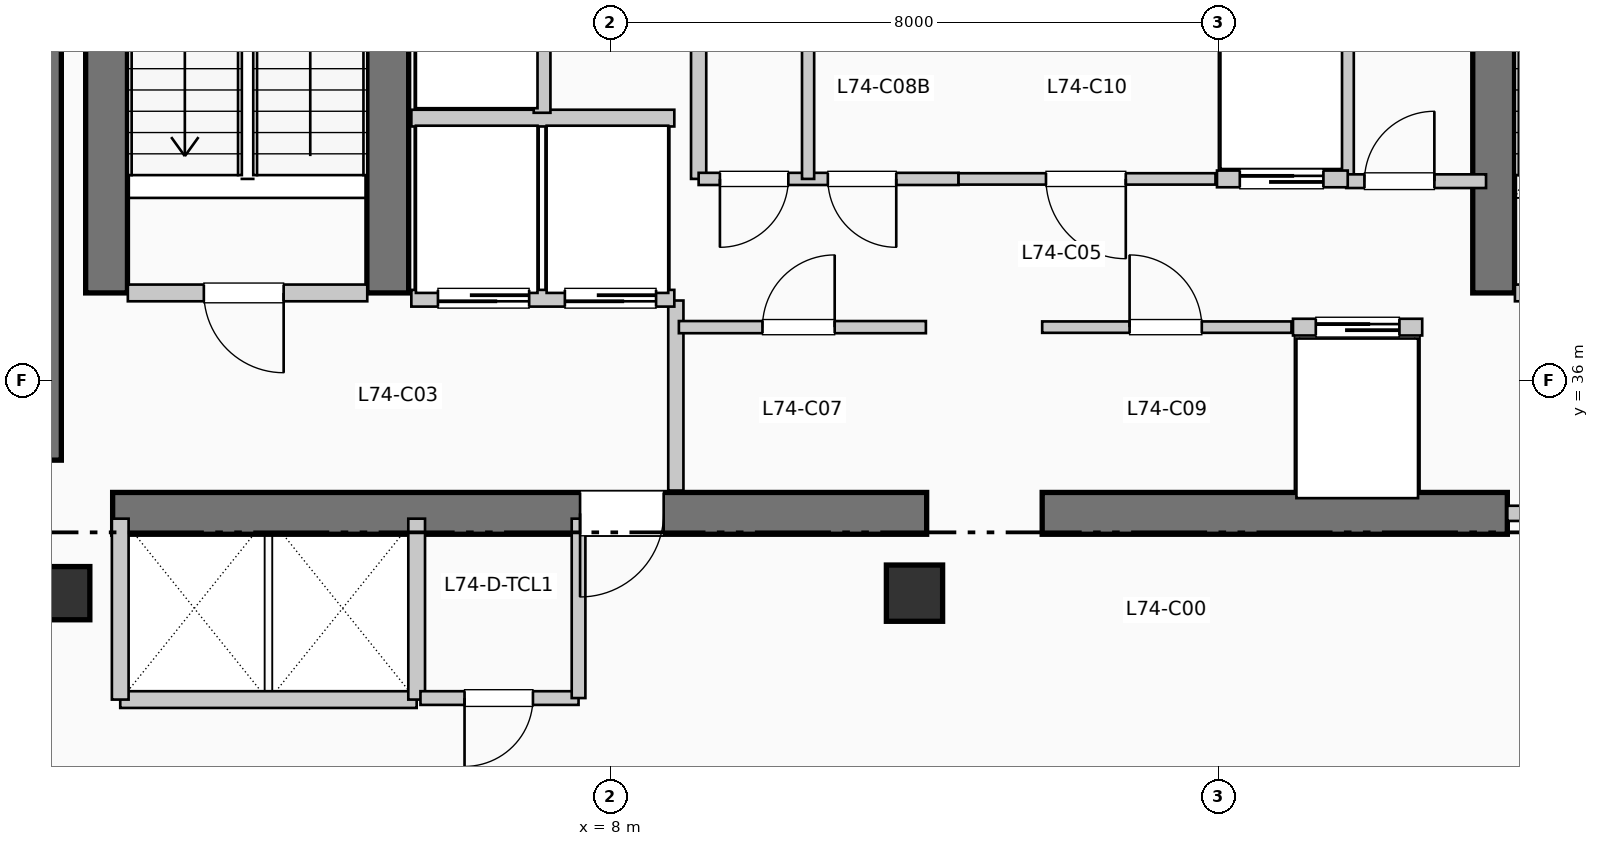
"""IFC4 building model, lengths in metres.
Left out: names, types, materials, properties, quantities, classifications, styles, units other than length and angle.
Written with IfcOpenShell. Run it as: python <this file> out.ifc"""

import sys

from ifc_helpers import new_model, si_unit, direction, frame, frame_2d, origin, origin_2d, place, context, subcontext, project, spatial, rectangle, extrude, element, fill, save


model = new_model("IFC4")
c1 = context("Model", 3, precision=1e-05, world=origin(), true_north=direction((0.0, 1.0)))
c2 = subcontext(c1, "Body", "Model", "MODEL_VIEW")
j1 = project(units=[si_unit("LENGTHUNIT", "METRE"), si_unit("PLANEANGLEUNIT", "RADIAN")], contexts=[c1])
p1 = place(None, origin())
s1 = spatial("IfcSite", under=j1, at=p1, CompositionType="ELEMENT")
p2 = place(p1, origin())
s2 = spatial("IfcBuilding", under=s1, at=p2, CompositionType="ELEMENT")
p3 = place(p2, frame((0.0, 0.0, 303.93)))
s3 = spatial("IfcBuildingStorey", under=s2, at=p3, CompositionType="ELEMENT", Elevation=303.93)
p4 = place(p3, frame((0.5, 34.95, 0.0), z_axis=(0.0, 0.0, 1.0), x_axis=(0.0, 1.0, 0.0)))
e1 = element("IfcWall", 1, at=p4, inside=s3, PredefinedType="SHEAR", context=c2, shape_type="SweptSolid", body=[
    extrude(rectangle(XDim=7.9, YDim=0.55, at=frame_2d((3.95, 0.0))), origin(), (0.0, 0.0, 1.0), 3.96),
])
p5 = place(p3, frame((1.45, 34.25, 0.0), z_axis=(0.0, 0.0, 1.0), x_axis=(1.0, 0.0, 0.0)))
e2 = element("IfcWall", 2, at=p5, inside=s3, PredefinedType="SHEAR", context=c2, shape_type="SweptSolid", body=[
    extrude(rectangle(XDim=10.71, YDim=0.55, at=frame_2d((5.355, 0.0))), origin(), (0.0, 0.0, 1.0), 3.96),
])
p6 = place(p5, frame((7.25, 0.0, 0.0), z_axis=(0.0, 0.0, 1.0), x_axis=(-1.0, 0.0, 0.0)))
e3 = element("IfcOpeningElement", 3, at=p6, cuts=e2, PredefinedType="OPENING", context=c2, shape_type="SweptSolid", body=[
    extrude(rectangle(XDim=1.1, YDim=2.15, at=frame_2d((0.55, 1.075))), frame((0.0, 0.285, 0.0), z_axis=(0.0, -1.0, 0.0), x_axis=(1.0, 0.0, 0.0)), (0.0, 0.0, 1.0), 0.57),
])
p7 = place(p3, frame((13.68, 34.25, 0.0), z_axis=(0.0, 0.0, 1.0), x_axis=(1.0, 0.0, 0.0)))
e4 = element("IfcWall", 4, at=p7, inside=s3, PredefinedType="SHEAR", context=c2, shape_type="SweptSolid", body=[
    extrude(rectangle(XDim=6.12, YDim=0.55, at=frame_2d((3.06, 0.0))), origin(), (0.0, 0.0, 1.0), 3.96),
])
for number, where, z_axis, x_axis in (
    (5, (1.37, 37.15, 0.0), (0.0, 0.0, 1.0), (0.0, 1.0, 0.0)),
    (6, (5.07, 37.15, 0.0), (0.0, 0.0, 1.0), (0.0, 1.0, 0.0)),
    (7, (19.62, 37.15, 0.0), (0.0, 0.0, 1.0), (0.0, 1.0, 0.0)),
):
    element("IfcWall", number, at=place(p3, frame(where, z_axis=z_axis, x_axis=x_axis)), inside=s3, PredefinedType="SHEAR", context=c2, shape_type="SweptSolid", body=[
        extrude(rectangle(XDim=7.89, YDim=0.55, at=frame_2d((3.945, 0.0))), origin(), (0.0, 0.0, 1.0), 3.96),
    ])
p8 = place(p3, frame((0.8, 33.2, 0.0), z_axis=(0.0, 0.0, 1.0), x_axis=(1.0, 0.0, 0.0)))
e8 = element("IfcColumn", 8, at=p8, inside=s3, PredefinedType="COLUMN", context=c2, shape_type="SweptSolid", body=[
    extrude(rectangle(XDim=0.7, YDim=0.7, at=origin_2d()), origin(), (0.0, 0.0, 1.0), 3.96),
])
p9 = place(p3, frame((12.0, 33.2, 0.0), z_axis=(0.0, 0.0, 1.0), x_axis=(1.0, 0.0, 0.0)))
e9 = element("IfcColumn", 9, at=p9, inside=s3, PredefinedType="COLUMN", context=c2, shape_type="SweptSolid", body=[
    extrude(rectangle(XDim=0.74, YDim=0.74, at=origin_2d()), origin(), (0.0, 0.0, 1.0), 3.96),
])
p10 = place(p3, frame((1.65, 37.15, 0.0), z_axis=(0.0, 0.0, 1.0), x_axis=(1.0, 0.0, 0.0)))
e10 = element("IfcWall", 10, at=p10, inside=s3, PredefinedType="PARTITIONING", context=c2, shape_type="SweptSolid", body=[
    extrude(rectangle(XDim=3.15, YDim=0.22, at=frame_2d((1.575, 0.0))), origin(), (0.0, 0.0, 1.0), 3.74),
])
p11 = place(p10, frame((2.05, 0.0, 0.0), z_axis=(0.0, 0.0, 1.0), x_axis=(-1.0, 0.0, 0.0)))
e11 = element("IfcOpeningElement", 11, at=p11, cuts=e10, PredefinedType="OPENING", context=c2, shape_type="SweptSolid", body=[
    extrude(rectangle(XDim=1.05, YDim=2.15, at=frame_2d((0.525, 1.075))), frame((0.0, 0.12, 0.0), z_axis=(0.0, -1.0, 0.0), x_axis=(1.0, 0.0, 0.0)), (0.0, 0.0, 1.0), 0.24),
])
p12 = place(p3, frame((8.86, 34.55, 0.0), z_axis=(0.0, 0.0, 1.0), x_axis=(0.0, 1.0, 0.0)))
e12 = element("IfcWall", 12, at=p12, inside=s3, PredefinedType="PARTITIONING", context=c2, shape_type="SweptSolid", body=[
    extrude(rectangle(XDim=2.5, YDim=0.2, at=frame_2d((1.25, 0.0))), origin(), (0.0, 0.0, 1.0), 3.74),
])
p13 = place(p3, frame((19.9, 37.15, 0.0), z_axis=(0.0, 0.0, 1.0), x_axis=(1.0, 0.0, 0.0)))
e13 = element("IfcWall", 13, at=p13, inside=s3, PredefinedType="PARTITIONING", context=c2, shape_type="SweptSolid", body=[
    extrude(rectangle(XDim=3.15, YDim=0.22, at=frame_2d((1.575, 0.0))), origin(), (0.0, 0.0, 1.0), 3.74),
])
p14 = place(p13, frame((2.05, 0.0, 0.0), z_axis=(0.0, 0.0, 1.0), x_axis=(-1.0, 0.0, 0.0)))
e14 = element("IfcOpeningElement", 14, at=p14, cuts=e13, PredefinedType="OPENING", context=c2, shape_type="SweptSolid", body=[
    extrude(rectangle(XDim=1.05, YDim=2.15, at=frame_2d((0.525, 1.075))), frame((0.0, 0.12, 0.0), z_axis=(0.0, -1.0, 0.0), x_axis=(1.0, 0.0, 0.0)), (0.0, 0.0, 1.0), 0.24),
])
p15 = place(p3, frame((19.8, 34.25, 0.0), z_axis=(0.0, 0.0, 1.0), x_axis=(1.0, 0.0, 0.0)))
e15 = element("IfcWall", 15, at=p15, inside=s3, PredefinedType="PARTITIONING", context=c2, shape_type="SweptSolid", body=[
    extrude(rectangle(XDim=3.25, YDim=0.2, at=frame_2d((1.625, 0.0))), origin(), (0.0, 0.0, 1.0), 3.74),
])
p16 = place(p15, frame((2.15, 0.0, 0.0), z_axis=(0.0, 0.0, 1.0), x_axis=(-1.0, 0.0, 0.0)))
e16 = element("IfcOpeningElement", 16, at=p16, cuts=e15, PredefinedType="OPENING", context=c2, shape_type="SweptSolid", body=[
    extrude(rectangle(XDim=1.1, YDim=2.15, at=frame_2d((0.55, 1.075))), frame((0.0, 0.11, 0.0), z_axis=(0.0, -1.0, 0.0), x_axis=(1.0, 0.0, 0.0)), (0.0, 0.0, 1.0), 0.22),
])
p17 = place(p3, frame((5.38, 37.08, 0.0), z_axis=(0.0, 0.0, 1.0), x_axis=(1.0, 0.0, 0.0)))
e17 = element("IfcWall", 17, at=p17, inside=s3, PredefinedType="PARTITIONING", context=c2, shape_type="SweptSolid", body=[
    extrude(rectangle(XDim=3.46, YDim=0.22, at=frame_2d((1.73, 0.0))), origin(), (0.0, 0.0, 1.0), 3.74),
])
p18 = place(p17, frame((1.55, 0.0, 0.0), z_axis=(0.0, 0.0, 1.0), x_axis=(-1.0, 0.0, 0.0)))
e18 = element("IfcOpeningElement", 18, at=p18, cuts=e17, PredefinedType="OPENING", context=c2, shape_type="SweptSolid", body=[
    extrude(rectangle(XDim=1.2, YDim=2.2, at=frame_2d((0.6, 1.1))), frame((0.0, 0.12, 0.0), z_axis=(0.0, -1.0, 0.0), x_axis=(1.0, 0.0, 0.0)), (0.0, 0.0, 1.0), 0.24),
])
p19 = place(p17, frame((3.22, 0.0, 0.0), z_axis=(0.0, 0.0, 1.0), x_axis=(-1.0, 0.0, 0.0)))
e19 = element("IfcOpeningElement", 19, at=p19, cuts=e17, PredefinedType="OPENING", context=c2, shape_type="SweptSolid", body=[
    extrude(rectangle(XDim=1.2, YDim=2.2, at=frame_2d((0.6, 1.1))), frame((0.0, 0.12, 0.0), z_axis=(0.0, -1.0, 0.0), x_axis=(1.0, 0.0, 0.0)), (0.0, 0.0, 1.0), 0.24),
])
p20 = place(p3, frame((5.38, 39.45, 0.0), z_axis=(0.0, 0.0, 1.0), x_axis=(1.0, 0.0, 0.0)))
e20 = element("IfcWall", 20, at=p20, inside=s3, PredefinedType="PARTITIONING", context=c2, shape_type="SweptSolid", body=[
    extrude(rectangle(XDim=3.46, YDim=0.22, at=frame_2d((1.73, 0.0))), origin(), (0.0, 0.0, 1.0), 3.74),
])
p21 = place(p3, frame((7.1, 39.52, 0.0), z_axis=(0.0, 0.0, 1.0), x_axis=(0.0, 1.0, 0.0)))
e21 = element("IfcWall", 21, at=p21, inside=s3, PredefinedType="PARTITIONING", context=c2, shape_type="SweptSolid", body=[
    extrude(rectangle(XDim=2.93, YDim=0.22, at=frame_2d((1.465, 0.0))), origin(), (0.0, 0.0, 1.0), 3.74),
])
p22 = place(p21, frame((0.85, 0.0, 0.0)))
e22 = element("IfcOpeningElement", 22, at=p22, cuts=e21, PredefinedType="OPENING", context=c2, shape_type="SweptSolid", body=[
    extrude(rectangle(XDim=1.1, YDim=2.2, at=frame_2d((0.55, 1.1))), frame((0.0, 0.12, 0.0), z_axis=(0.0, -1.0, 0.0), x_axis=(1.0, 0.0, 0.0)), (0.0, 0.0, 1.0), 0.24),
])
p23 = place(p3, frame((1.55, 31.8, 0.0), z_axis=(0.0, 0.0, 1.0), x_axis=(1.0, 0.0, 0.0)))
e23 = element("IfcWall", 23, at=p23, inside=s3, PredefinedType="PARTITIONING", context=c2, shape_type="SweptSolid", body=[
    extrude(rectangle(XDim=3.9, YDim=0.22, at=frame_2d((1.95, 0.0))), origin(), (0.0, 0.0, 1.0), 3.74),
])
for number, where, z_axis, x_axis in (
    (24, (1.55, 31.8, 0.0), (0.0, 0.0, 1.0), (0.0, 1.0, 0.0)),
    (25, (5.45, 31.8, 0.0), (0.0, 0.0, 1.0), (0.0, 1.0, 0.0)),
):
    element("IfcWall", number, at=place(p3, frame(where, z_axis=z_axis, x_axis=x_axis)), inside=s3, PredefinedType="PARTITIONING", context=c2, shape_type="SweptSolid", body=[
        extrude(rectangle(XDim=2.38, YDim=0.22, at=frame_2d((1.19, 0.0))), origin(), (0.0, 0.0, 1.0), 3.74),
    ])
for number, where, z_axis, x_axis in (
    (26, (9.16, 38.65, 0.0), (0.0, 0.0, 1.0), (0.0, 1.0, 0.0)),
    (27, (17.68, 38.65, 0.0), (0.0, 0.0, 1.0), (0.0, 1.0, 0.0)),
):
    element("IfcWall", number, at=place(p3, frame(where, z_axis=z_axis, x_axis=x_axis)), inside=s3, PredefinedType="PARTITIONING", context=c2, shape_type="SweptSolid", body=[
        extrude(rectangle(XDim=2.35, YDim=0.2, at=frame_2d((1.175, 0.0))), origin(), (0.0, 0.0, 1.0), 3.74),
    ])
p24 = place(p3, frame((17.68, 38.62, 0.0), z_axis=(0.0, 0.0, 1.0), x_axis=(1.0, 0.0, 0.0)))
e28 = element("IfcWall", 28, at=p24, inside=s3, PredefinedType="PARTITIONING", context=c2, shape_type="SweptSolid", body=[
    extrude(rectangle(XDim=1.84, YDim=0.18, at=frame_2d((0.92, 0.0))), origin(), (0.0, 0.0, 1.0), 3.74),
])
p25 = place(p24, frame((0.24, 0.0, 0.0)))
e29 = element("IfcOpeningElement", 29, at=p25, cuts=e28, PredefinedType="OPENING", context=c2, shape_type="SweptSolid", body=[
    extrude(rectangle(XDim=0.92, YDim=2.1, at=frame_2d((0.46, 1.05))), frame((0.0, 0.1, 0.0), z_axis=(0.0, -1.0, 0.0), x_axis=(1.0, 0.0, 0.0)), (0.0, 0.0, 1.0), 0.2),
])
p26 = place(p3, frame((5.5, 31.82, 0.0), z_axis=(0.0, 0.0, 1.0), x_axis=(1.0, 0.0, 0.0)))
e30 = element("IfcWall", 30, at=p26, inside=s3, PredefinedType="PLUMBINGWALL", context=c2, shape_type="SweptSolid", body=[
    extrude(rectangle(XDim=2.08, YDim=0.18, at=frame_2d((1.04, 0.0))), origin(), (0.0, 0.0, 1.0), 3.74),
])
p27 = place(p26, frame((1.48, 0.0, 0.0), z_axis=(0.0, 0.0, 1.0), x_axis=(-1.0, 0.0, 0.0)))
e31 = element("IfcOpeningElement", 31, at=p27, cuts=e30, PredefinedType="OPENING", context=c2, shape_type="SweptSolid", body=[
    extrude(rectangle(XDim=0.9, YDim=2.1, at=frame_2d((0.45, 1.05))), frame((0.0, 0.1, 0.0), z_axis=(0.0, -1.0, 0.0), x_axis=(1.0, 0.0, 0.0)), (0.0, 0.0, 1.0), 0.2),
])
p28 = place(p3, frame((7.58, 31.82, 0.0), z_axis=(0.0, 0.0, 1.0), x_axis=(0.0, 1.0, 0.0)))
e32 = element("IfcWall", 32, at=p28, inside=s3, PredefinedType="PLUMBINGWALL", context=c2, shape_type="SweptSolid", body=[
    extrude(rectangle(XDim=2.36, YDim=0.18, at=frame_2d((1.18, 0.0))), origin(), (0.0, 0.0, 1.0), 3.74),
])
p29 = place(p3, frame((8.9, 36.7, 0.0), z_axis=(0.0, 0.0, 1.0), x_axis=(1.0, 0.0, 0.0)))
e33 = element("IfcWall", 33, at=p29, inside=s3, PredefinedType="PARTITIONING", context=c2, shape_type="SweptSolid", body=[
    extrude(rectangle(XDim=3.25, YDim=0.16, at=frame_2d((1.625, 0.0))), origin(), (0.0, 0.0, 1.0), 3.74),
])
p30 = place(p29, frame((1.1, 0.0, 0.0)))
e34 = element("IfcOpeningElement", 34, at=p30, cuts=e33, PredefinedType="OPENING", context=c2, shape_type="SweptSolid", body=[
    extrude(rectangle(XDim=0.95, YDim=2.15, at=frame_2d((0.475, 1.075))), frame((0.0, 0.09, 0.0), z_axis=(0.0, -1.0, 0.0), x_axis=(1.0, 0.0, 0.0)), (0.0, 0.0, 1.0), 0.18),
])
p31 = place(p3, frame((9.16, 38.65, 0.0), z_axis=(0.0, 0.0, 1.0), x_axis=(1.0, 0.0, 0.0)))
e35 = element("IfcWall", 35, at=p31, inside=s3, PredefinedType="PARTITIONING", context=c2, shape_type="SweptSolid", body=[
    extrude(rectangle(XDim=3.42, YDim=0.16, at=frame_2d((1.71, 0.0))), origin(), (0.0, 0.0, 1.0), 3.74),
])
p32 = place(p31, frame((1.18, 0.0, 0.0), z_axis=(0.0, 0.0, 1.0), x_axis=(-1.0, 0.0, 0.0)))
e36 = element("IfcOpeningElement", 36, at=p32, cuts=e35, PredefinedType="OPENING", context=c2, shape_type="SweptSolid", body=[
    extrude(rectangle(XDim=0.9, YDim=2.15, at=frame_2d((0.45, 1.075))), frame((0.0, 0.09, 0.0), z_axis=(0.0, -1.0, 0.0), x_axis=(1.0, 0.0, 0.0)), (0.0, 0.0, 1.0), 0.18),
])
p33 = place(p31, frame((2.6, 0.0, 0.0), z_axis=(0.0, 0.0, 1.0), x_axis=(-1.0, 0.0, 0.0)))
e37 = element("IfcOpeningElement", 37, at=p33, cuts=e35, PredefinedType="OPENING", context=c2, shape_type="SweptSolid", body=[
    extrude(rectangle(XDim=0.9, YDim=2.15, at=frame_2d((0.45, 1.075))), frame((0.0, 0.09, 0.0), z_axis=(0.0, -1.0, 0.0), x_axis=(1.0, 0.0, 0.0)), (0.0, 0.0, 1.0), 0.18),
])
p34 = place(p3, frame((10.6, 38.65, 0.0), z_axis=(0.0, 0.0, 1.0), x_axis=(0.0, 1.0, 0.0)))
e38 = element("IfcWall", 38, at=p34, inside=s3, PredefinedType="PARTITIONING", context=c2, shape_type="SweptSolid", body=[
    extrude(rectangle(XDim=2.35, YDim=0.16, at=frame_2d((1.175, 0.0))), origin(), (0.0, 0.0, 1.0), 3.74),
])
p35 = place(p3, frame((13.68, 36.7, 0.0), z_axis=(0.0, 0.0, 1.0), x_axis=(1.0, 0.0, 0.0)))
e39 = element("IfcWall", 39, at=p35, inside=s3, PredefinedType="PARTITIONING", context=c2, shape_type="SweptSolid", body=[
    extrude(rectangle(XDim=3.28, YDim=0.15, at=frame_2d((1.64, 0.0))), origin(), (0.0, 0.0, 1.0), 3.74),
])
p36 = place(p35, frame((1.15, 0.0, 0.0)))
e40 = element("IfcOpeningElement", 40, at=p36, cuts=e39, PredefinedType="OPENING", context=c2, shape_type="SweptSolid", body=[
    extrude(rectangle(XDim=0.95, YDim=2.15, at=frame_2d((0.475, 1.075))), frame((0.0, 0.085, 0.0), z_axis=(0.0, -1.0, 0.0), x_axis=(1.0, 0.0, 0.0)), (0.0, 0.0, 1.0), 0.17),
])
p37 = place(p3, frame((12.58, 38.65, 0.0), z_axis=(0.0, 0.0, 1.0), x_axis=(1.0, 0.0, 0.0)))
e41 = element("IfcWall", 41, at=p37, inside=s3, PredefinedType="PARTITIONING", context=c2, shape_type="SweptSolid", body=[
    extrude(rectangle(XDim=3.38, YDim=0.15, at=frame_2d((1.69, 0.0))), origin(), (0.0, 0.0, 1.0), 3.74),
])
p38 = place(p37, frame((2.2, 0.0, 0.0), z_axis=(0.0, 0.0, 1.0), x_axis=(-1.0, 0.0, 0.0)))
e42 = element("IfcOpeningElement", 42, at=p38, cuts=e41, PredefinedType="OPENING", context=c2, shape_type="SweptSolid", body=[
    extrude(rectangle(XDim=1.05, YDim=2.15, at=frame_2d((0.525, 1.075))), frame((0.0, 0.085, 0.0), z_axis=(0.0, -1.0, 0.0), x_axis=(1.0, 0.0, 0.0)), (0.0, 0.0, 1.0), 0.17),
])
p39 = place(p3, frame((16.98, 36.7, 0.0), z_axis=(0.0, 0.0, 1.0), x_axis=(1.0, 0.0, 0.0)))
e43 = element("IfcWall", 43, at=p39, inside=s3, PredefinedType="PARTITIONING", context=c2, shape_type="SweptSolid", body=[
    extrude(rectangle(XDim=1.7, YDim=0.22, at=frame_2d((0.85, 0.0))), origin(), (0.0, 0.0, 1.0), 3.74),
])
p40 = place(p39, frame((0.3, 0.0, 0.0)))
e44 = element("IfcOpeningElement", 44, at=p40, cuts=e43, PredefinedType="OPENING", context=c2, shape_type="SweptSolid", body=[
    extrude(rectangle(XDim=1.1, YDim=2.2, at=frame_2d((0.55, 1.1))), frame((0.0, 0.12, 0.0), z_axis=(0.0, -1.0, 0.0), x_axis=(1.0, 0.0, 0.0)), (0.0, 0.0, 1.0), 0.24),
])
p41 = place(p3, frame((15.98, 38.65, 0.0), z_axis=(0.0, 0.0, 1.0), x_axis=(1.0, 0.0, 0.0)))
e45 = element("IfcWall", 45, at=p41, inside=s3, PredefinedType="PARTITIONING", context=c2, shape_type="SweptSolid", body=[
    extrude(rectangle(XDim=1.72, YDim=0.22, at=frame_2d((0.86, 0.0))), origin(), (0.0, 0.0, 1.0), 3.74),
])
p42 = place(p41, frame((0.3, 0.0, 0.0)))
e46 = element("IfcOpeningElement", 46, at=p42, cuts=e45, PredefinedType="OPENING", context=c2, shape_type="SweptSolid", body=[
    extrude(rectangle(XDim=1.1, YDim=2.2, at=frame_2d((0.55, 1.1))), frame((0.0, 0.12, 0.0), z_axis=(0.0, -1.0, 0.0), x_axis=(1.0, 0.0, 0.0)), (0.0, 0.0, 1.0), 0.24),
])
p43 = place(p11, origin())
e47 = element("IfcDoor", 47, at=p43, inside=s3, OperationType="SINGLE_SWING_RIGHT", PredefinedType="DOOR", context=c2, shape_type="SweptSolid", body=[
    extrude(rectangle(XDim=1.05, YDim=2.15, at=frame_2d((0.525, 1.075))), frame((0.0, 0.025, 0.0), z_axis=(0.0, -1.0, 0.0), x_axis=(1.0, 0.0, 0.0)), (0.0, 0.0, 1.0), 0.05),
])
fill(e11, e47)
p44 = place(p6, origin())
e48 = element("IfcDoor", 48, at=p44, inside=s3, OperationType="SINGLE_SWING_LEFT", PredefinedType="DOOR", context=c2, shape_type="SweptSolid", body=[
    extrude(rectangle(XDim=1.1, YDim=2.15, at=frame_2d((0.55, 1.075))), frame((0.0, 0.025, 0.0), z_axis=(0.0, -1.0, 0.0), x_axis=(1.0, 0.0, 0.0)), (0.0, 0.0, 1.0), 0.05),
])
fill(e3, e48)
p45 = place(p18, origin())
e49 = element("IfcDoor", 49, at=p45, inside=s3, OperationType="SLIDING_TO_RIGHT", PredefinedType="DOOR", context=c2, shape_type="SweptSolid", body=[
    extrude(rectangle(XDim=1.2, YDim=2.2, at=frame_2d((0.6, 1.1))), frame((0.0, 0.025, 0.0), z_axis=(0.0, -1.0, 0.0), x_axis=(1.0, 0.0, 0.0)), (0.0, 0.0, 1.0), 0.05),
])
fill(e18, e49)
p46 = place(p19, origin())
e50 = element("IfcDoor", 50, at=p46, inside=s3, OperationType="SLIDING_TO_RIGHT", PredefinedType="DOOR", context=c2, shape_type="SweptSolid", body=[
    extrude(rectangle(XDim=1.2, YDim=2.2, at=frame_2d((0.6, 1.1))), frame((0.0, 0.025, 0.0), z_axis=(0.0, -1.0, 0.0), x_axis=(1.0, 0.0, 0.0)), (0.0, 0.0, 1.0), 0.05),
])
fill(e19, e50)
p47 = place(p25, origin())
e51 = element("IfcDoor", 51, at=p47, inside=s3, OperationType="SINGLE_SWING_RIGHT", PredefinedType="DOOR", context=c2, shape_type="SweptSolid", body=[
    extrude(rectangle(XDim=0.92, YDim=2.1, at=frame_2d((0.46, 1.05))), frame((0.0, 0.025, 0.0), z_axis=(0.0, -1.0, 0.0), x_axis=(1.0, 0.0, 0.0)), (0.0, 0.0, 1.0), 0.05),
])
fill(e29, e51)
p48 = place(p27, origin())
e52 = element("IfcDoor", 52, at=p48, inside=s3, OperationType="SINGLE_SWING_LEFT", PredefinedType="DOOR", context=c2, shape_type="SweptSolid", body=[
    extrude(rectangle(XDim=0.9, YDim=2.1, at=frame_2d((0.45, 1.05))), frame((0.0, 0.025, 0.0), z_axis=(0.0, -1.0, 0.0), x_axis=(1.0, 0.0, 0.0)), (0.0, 0.0, 1.0), 0.05),
])
fill(e31, e52)
p49 = place(p30, origin())
e53 = element("IfcDoor", 53, at=p49, inside=s3, OperationType="SINGLE_SWING_RIGHT", PredefinedType="DOOR", context=c2, shape_type="SweptSolid", body=[
    extrude(rectangle(XDim=0.95, YDim=2.15, at=frame_2d((0.475, 1.075))), frame((0.0, 0.025, 0.0), z_axis=(0.0, -1.0, 0.0), x_axis=(1.0, 0.0, 0.0)), (0.0, 0.0, 1.0), 0.05),
])
fill(e34, e53)
p50 = place(p32, origin())
e54 = element("IfcDoor", 54, at=p50, inside=s3, OperationType="SINGLE_SWING_LEFT", PredefinedType="DOOR", context=c2, shape_type="SweptSolid", body=[
    extrude(rectangle(XDim=0.9, YDim=2.15, at=frame_2d((0.45, 1.075))), frame((0.0, 0.025, 0.0), z_axis=(0.0, -1.0, 0.0), x_axis=(1.0, 0.0, 0.0)), (0.0, 0.0, 1.0), 0.05),
])
fill(e36, e54)
p51 = place(p33, origin())
e55 = element("IfcDoor", 55, at=p51, inside=s3, OperationType="SINGLE_SWING_RIGHT", PredefinedType="DOOR", context=c2, shape_type="SweptSolid", body=[
    extrude(rectangle(XDim=0.9, YDim=2.15, at=frame_2d((0.45, 1.075))), frame((0.0, 0.025, 0.0), z_axis=(0.0, -1.0, 0.0), x_axis=(1.0, 0.0, 0.0)), (0.0, 0.0, 1.0), 0.05),
])
fill(e37, e55)
p52 = place(p36, origin())
e56 = element("IfcDoor", 56, at=p52, inside=s3, OperationType="SINGLE_SWING_LEFT", PredefinedType="DOOR", context=c2, shape_type="SweptSolid", body=[
    extrude(rectangle(XDim=0.95, YDim=2.15, at=frame_2d((0.475, 1.075))), frame((0.0, 0.025, 0.0), z_axis=(0.0, -1.0, 0.0), x_axis=(1.0, 0.0, 0.0)), (0.0, 0.0, 1.0), 0.05),
])
fill(e40, e56)
p53 = place(p38, origin())
e57 = element("IfcDoor", 57, at=p53, inside=s3, OperationType="SINGLE_SWING_RIGHT", PredefinedType="DOOR", context=c2, shape_type="SweptSolid", body=[
    extrude(rectangle(XDim=1.05, YDim=2.15, at=frame_2d((0.525, 1.075))), frame((0.0, 0.025, 0.0), z_axis=(0.0, -1.0, 0.0), x_axis=(1.0, 0.0, 0.0)), (0.0, 0.0, 1.0), 0.05),
])
fill(e42, e57)
p54 = place(p40, origin())
e58 = element("IfcDoor", 58, at=p54, inside=s3, OperationType="SLIDING_TO_LEFT", PredefinedType="DOOR", context=c2, shape_type="SweptSolid", body=[
    extrude(rectangle(XDim=1.1, YDim=2.2, at=frame_2d((0.55, 1.1))), frame((0.0, 0.025, 0.0), z_axis=(0.0, -1.0, 0.0), x_axis=(1.0, 0.0, 0.0)), (0.0, 0.0, 1.0), 0.05),
])
fill(e44, e58)
p55 = place(p42, origin())
e59 = element("IfcDoor", 59, at=p55, inside=s3, OperationType="SLIDING_TO_LEFT", PredefinedType="DOOR", context=c2, shape_type="SweptSolid", body=[
    extrude(rectangle(XDim=1.1, YDim=2.2, at=frame_2d((0.55, 1.1))), frame((0.0, 0.025, 0.0), z_axis=(0.0, -1.0, 0.0), x_axis=(1.0, 0.0, 0.0)), (0.0, 0.0, 1.0), 0.05),
])
fill(e46, e59)
save(model, sys.argv[1])
